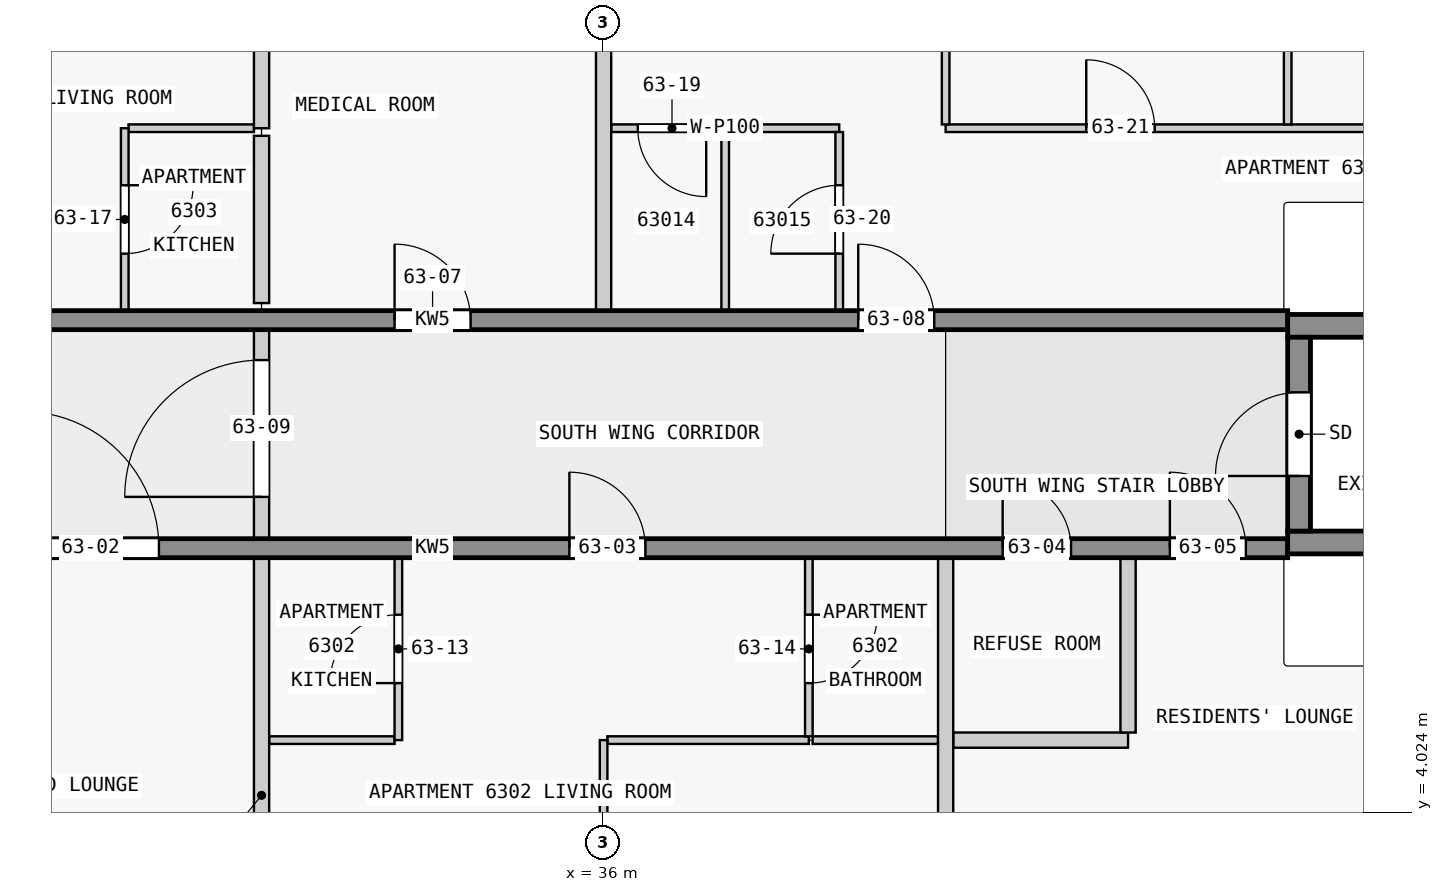
"""IFC4 building model, lengths in metres.
Left out: names, types, materials, properties, quantities, classifications, styles, units other than length and angle.
Written with IfcOpenShell. Run it as: python <this file> out.ifc"""

import sys

from ifc_helpers import new_model, si_unit, direction, frame, frame_2d, origin, place, context, subcontext, project, spatial, rectangle, extrude, element, fill, save


model = new_model("IFC4")
c1 = context("Model", 3, precision=1e-05, world=origin(), true_north=direction((0.0, 1.0)))
c2 = subcontext(c1, "Body", "Model", "MODEL_VIEW")
j1 = project(units=[si_unit("LENGTHUNIT", "METRE"), si_unit("PLANEANGLEUNIT", "RADIAN")], contexts=[c1])
p1 = place(None, origin())
s1 = spatial("IfcSite", under=j1, at=p1, CompositionType="ELEMENT")
p2 = place(p1, origin())
s2 = spatial("IfcBuilding", under=s1, at=p2, CompositionType="ELEMENT")
p3 = place(p2, frame((0.0, 0.0, 242.4)))
s3 = spatial("IfcBuildingStorey", under=s2, at=p3, CompositionType="ELEMENT", Elevation=242.4)
p4 = place(p3, frame((45.15, 7.725, 0.0), z_axis=(0.0, 0.0, 1.0), x_axis=(0.0, 1.0, 0.0)))
e1 = element("IfcWall", 1, at=p4, inside=s3, PredefinedType="SHEAR", context=c2, shape_type="SweptSolid", body=[
    extrude(rectangle(XDim=2.55, YDim=0.3, at=frame_2d((1.275, 0.0))), origin(), (0.0, 0.0, 1.0), 3.5),
])
p5 = place(p4, frame((0.725, 0.0, 0.0)))
e2 = element("IfcOpeningElement", 2, at=p5, cuts=e1, PredefinedType="OPENING", context=c2, shape_type="SweptSolid", body=[
    extrude(rectangle(XDim=1.1, YDim=2.1, at=frame_2d((0.55, 1.05))), frame((0.0, 0.16, 0.0), z_axis=(0.0, -1.0, 0.0), x_axis=(1.0, 0.0, 0.0)), (0.0, 0.0, 1.0), 0.32),
])
for number, where, z_axis, x_axis in (
    (3, (45.0, 7.575, 0.0), (0.0, 0.0, 1.0), (1.0, 0.0, 0.0)),
    (4, (45.0, 10.425, 0.0), (0.0, 0.0, 1.0), (1.0, 0.0, 0.0)),
):
    element("IfcWall", number, at=place(p3, frame(where, z_axis=z_axis, x_axis=x_axis)), inside=s3, PredefinedType="SHEAR", context=c2, shape_type="SweptSolid", body=[
        extrude(rectangle(XDim=7.2, YDim=0.3, at=frame_2d((3.6, 0.0))), origin(), (0.0, 0.0, 1.0), 3.5),
    ])
p6 = place(p3, frame((22.5, 7.5, 0.0), z_axis=(0.0, 0.0, 1.0), x_axis=(1.0, 0.0, 0.0)))
e5 = element("IfcWall", 5, at=p6, inside=s3, PredefinedType="SHEAR", context=c2, shape_type="SweptSolid", body=[
    extrude(rectangle(XDim=22.5, YDim=0.25, at=frame_2d((11.25, 0.0))), origin(), (0.0, 0.0, 1.0), 3.25),
])
p7 = place(p6, frame((1.75, 0.0, 0.0)))
e6 = element("IfcOpeningElement", 6, at=p7, cuts=e5, PredefinedType="OPENING", context=c2, shape_type="SweptSolid", body=[
    extrude(rectangle(XDim=1.0, YDim=2.1, at=frame_2d((0.5, 1.05))), frame((0.0, 0.135, 0.0), z_axis=(0.0, -1.0, 0.0), x_axis=(1.0, 0.0, 0.0)), (0.0, 0.0, 1.0), 0.27),
])
p8 = place(p6, frame((5.85, 0.0, 0.0)))
e7 = element("IfcOpeningElement", 7, at=p8, cuts=e5, PredefinedType="OPENING", context=c2, shape_type="SweptSolid", body=[
    extrude(rectangle(XDim=1.8, YDim=2.1, at=frame_2d((0.9, 1.05))), frame((0.0, 0.135, 0.0), z_axis=(0.0, -1.0, 0.0), x_axis=(1.0, 0.0, 0.0)), (0.0, 0.0, 1.0), 0.27),
])
p9 = place(p6, frame((13.05, 0.0, 0.0)))
e8 = element("IfcOpeningElement", 8, at=p9, cuts=e5, PredefinedType="OPENING", context=c2, shape_type="SweptSolid", body=[
    extrude(rectangle(XDim=1.0, YDim=2.1, at=frame_2d((0.5, 1.05))), frame((0.0, 0.135, 0.0), z_axis=(0.0, -1.0, 0.0), x_axis=(1.0, 0.0, 0.0)), (0.0, 0.0, 1.0), 0.27),
])
p10 = place(p6, frame((18.75, 0.0, 0.0)))
e9 = element("IfcOpeningElement", 9, at=p10, cuts=e5, PredefinedType="OPENING", context=c2, shape_type="SweptSolid", body=[
    extrude(rectangle(XDim=0.9, YDim=2.1, at=frame_2d((0.45, 1.05))), frame((0.0, 0.135, 0.0), z_axis=(0.0, -1.0, 0.0), x_axis=(1.0, 0.0, 0.0)), (0.0, 0.0, 1.0), 0.27),
])
p11 = place(p6, frame((20.95, 0.0, 0.0)))
e10 = element("IfcOpeningElement", 10, at=p11, cuts=e5, PredefinedType="OPENING", context=c2, shape_type="SweptSolid", body=[
    extrude(rectangle(XDim=1.0, YDim=2.1, at=frame_2d((0.5, 1.05))), frame((0.0, 0.135, 0.0), z_axis=(0.0, -1.0, 0.0), x_axis=(1.0, 0.0, 0.0)), (0.0, 0.0, 1.0), 0.27),
])
p12 = place(p3, frame((22.5, 10.5, 0.0), z_axis=(0.0, 0.0, 1.0), x_axis=(1.0, 0.0, 0.0)))
e11 = element("IfcWall", 11, at=p12, inside=s3, PredefinedType="SHEAR", context=c2, shape_type="SweptSolid", body=[
    extrude(rectangle(XDim=22.5, YDim=0.25, at=frame_2d((11.25, 0.0))), origin(), (0.0, 0.0, 1.0), 3.25),
])
p13 = place(p12, frame((4.05, 0.0, 0.0)))
e12 = element("IfcOpeningElement", 12, at=p13, cuts=e11, PredefinedType="OPENING", context=c2, shape_type="SweptSolid", body=[
    extrude(rectangle(XDim=1.0, YDim=2.1, at=frame_2d((0.5, 1.05))), frame((0.0, 0.135, 0.0), z_axis=(0.0, -1.0, 0.0), x_axis=(1.0, 0.0, 0.0)), (0.0, 0.0, 1.0), 0.27),
])
p14 = place(p12, frame((10.75, 0.0, 0.0)))
e13 = element("IfcOpeningElement", 13, at=p14, cuts=e11, PredefinedType="OPENING", context=c2, shape_type="SweptSolid", body=[
    extrude(rectangle(XDim=1.0, YDim=2.1, at=frame_2d((0.5, 1.05))), frame((0.0, 0.135, 0.0), z_axis=(0.0, -1.0, 0.0), x_axis=(1.0, 0.0, 0.0)), (0.0, 0.0, 1.0), 0.27),
])
p15 = place(p12, frame((16.85, 0.0, 0.0)))
e14 = element("IfcOpeningElement", 14, at=p15, cuts=e11, PredefinedType="OPENING", context=c2, shape_type="SweptSolid", body=[
    extrude(rectangle(XDim=1.0, YDim=2.1, at=frame_2d((0.5, 1.05))), frame((0.0, 0.135, 0.0), z_axis=(0.0, -1.0, 0.0), x_axis=(1.0, 0.0, 0.0)), (0.0, 0.0, 1.0), 0.27),
])
p16 = place(p3, frame((38.7, 4.975, 0.0), z_axis=(0.0, 0.0, 1.0), x_axis=(-1.0, 0.0, 0.0)))
e15 = element("IfcWall", 15, at=p16, inside=s3, PredefinedType="PARTITIONING", context=c2, shape_type="SweptSolid", body=[
    extrude(rectangle(XDim=2.65, YDim=0.1, at=frame_2d((1.325, 0.0))), origin(), (0.0, 0.0, 1.0), 3.25),
])
for number, where, z_axis, x_axis in (
    (16, (31.6, 4.975, 0.0), (0.0, 0.0, 1.0), (1.0, 0.0, 0.0)),
    (17, (38.75, 4.975, 0.0), (0.0, 0.0, 1.0), (1.0, 0.0, 0.0)),
):
    element("IfcWall", number, at=place(p3, frame(where, z_axis=z_axis, x_axis=x_axis)), inside=s3, PredefinedType="PARTITIONING", context=c2, shape_type="SweptSolid", body=[
        extrude(rectangle(XDim=1.65, YDim=0.1, at=frame_2d((0.825, 0.0))), origin(), (0.0, 0.0, 1.0), 3.25),
    ])
p17 = place(p3, frame((40.6, 4.975, 0.0), z_axis=(0.0, 0.0, 1.0), x_axis=(1.0, 0.0, 0.0)))
e18 = element("IfcWall", 18, at=p17, inside=s3, PredefinedType="PARTITIONING", context=c2, shape_type="SweptSolid", body=[
    extrude(rectangle(XDim=2.3, YDim=0.2, at=frame_2d((1.15, 0.0))), origin(), (0.0, 0.0, 1.0), 3.25),
])
p18 = place(p3, frame((31.4, 13.025, 0.0), z_axis=(0.0, 0.0, 1.0), x_axis=(-1.0, 0.0, 0.0)))
e19 = element("IfcWall", 19, at=p18, inside=s3, PredefinedType="PARTITIONING", context=c2, shape_type="SweptSolid", body=[
    extrude(rectangle(XDim=1.65, YDim=0.1, at=frame_2d((0.825, 0.0))), origin(), (0.0, 0.0, 1.0), 3.25),
])
p19 = place(p3, frame((39.1, 13.025, 0.0), z_axis=(0.0, 0.0, 1.0), x_axis=(-1.0, 0.0, 0.0)))
e20 = element("IfcWall", 20, at=p19, inside=s3, PredefinedType="PARTITIONING", context=c2, shape_type="SweptSolid", body=[
    extrude(rectangle(XDim=3.0, YDim=0.1, at=frame_2d((1.5, 0.0))), origin(), (0.0, 0.0, 1.0), 3.25),
])
p20 = place(p19, frame((1.75, 0.0, 0.0)))
e21 = element("IfcOpeningElement", 21, at=p20, cuts=e20, PredefinedType="OPENING", context=c2, shape_type="SweptSolid", body=[
    extrude(rectangle(XDim=0.9, YDim=2.1, at=frame_2d((0.45, 1.05))), frame((0.0, 0.06, 0.0), z_axis=(0.0, -1.0, 0.0), x_axis=(1.0, 0.0, 0.0)), (0.0, 0.0, 1.0), 0.12),
])
p21 = place(p3, frame((40.5, 13.025, 0.0), z_axis=(0.0, 0.0, 1.0), x_axis=(1.0, 0.0, 0.0)))
e22 = element("IfcWall", 22, at=p21, inside=s3, PredefinedType="PARTITIONING", context=c2, shape_type="SweptSolid", body=[
    extrude(rectangle(XDim=13.58, YDim=0.1, at=frame_2d((6.79, 0.0))), origin(), (0.0, 0.0, 1.0), 3.25),
])
p22 = place(p21, frame((1.85, 0.0, 0.0)))
e23 = element("IfcOpeningElement", 23, at=p22, cuts=e22, PredefinedType="OPENING", context=c2, shape_type="SweptSolid", body=[
    extrude(rectangle(XDim=0.9, YDim=2.1, at=frame_2d((0.45, 1.05))), frame((0.0, 0.06, 0.0), z_axis=(0.0, -1.0, 0.0), x_axis=(1.0, 0.0, 0.0)), (0.0, 0.0, 1.0), 0.12),
])
p23 = place(p21, frame((6.35, 0.0, 0.0)))
e24 = element("IfcOpeningElement", 24, at=p23, cuts=e22, PredefinedType="OPENING", context=c2, shape_type="SweptSolid", body=[
    extrude(rectangle(XDim=0.9, YDim=2.1, at=frame_2d((0.45, 1.05))), frame((0.0, 0.06, 0.0), z_axis=(0.0, -1.0, 0.0), x_axis=(1.0, 0.0, 0.0)), (0.0, 0.0, 1.0), 0.12),
])
p24 = place(p21, frame((10.75, 0.0, 0.0)))
e25 = element("IfcOpeningElement", 25, at=p24, cuts=e22, PredefinedType="OPENING", context=c2, shape_type="SweptSolid", body=[
    extrude(rectangle(XDim=0.9, YDim=2.1, at=frame_2d((0.45, 1.05))), frame((0.0, 0.06, 0.0), z_axis=(0.0, -1.0, 0.0), x_axis=(1.0, 0.0, 0.0)), (0.0, 0.0, 1.0), 0.12),
])
p25 = place(p3, frame((29.7, 13.025, 0.0), z_axis=(0.0, 0.0, 1.0), x_axis=(0.0, -1.0, 0.0)))
e26 = element("IfcWall", 26, at=p25, inside=s3, PredefinedType="PARTITIONING", context=c2, shape_type="SweptSolid", body=[
    extrude(rectangle(XDim=2.4, YDim=0.1, at=frame_2d((1.2, 0.0))), origin(), (0.0, 0.0, 1.0), 3.25),
])
p26 = place(p25, frame((0.75, 0.0, 0.0)))
e27 = element("IfcOpeningElement", 27, at=p26, cuts=e26, PredefinedType="OPENING", context=c2, shape_type="SweptSolid", body=[
    extrude(rectangle(XDim=0.9, YDim=2.1, at=frame_2d((0.45, 1.05))), frame((0.0, 0.06, 0.0), z_axis=(0.0, -1.0, 0.0), x_axis=(1.0, 0.0, 0.0)), (0.0, 0.0, 1.0), 0.12),
])
p27 = place(p3, frame((31.5, 16.878, 0.0), z_axis=(0.0, 0.0, 1.0), x_axis=(0.0, -1.0, 0.0)))
e28 = element("IfcWall", 28, at=p27, inside=s3, PredefinedType="PARTITIONING", context=c2, shape_type="SweptSolid", body=[
    extrude(rectangle(XDim=3.853, YDim=0.2, at=frame_2d((1.926, 0.0))), origin(), (0.0, 0.0, 1.0), 3.25),
])
p28 = place(p3, frame((31.5, 1.122, 0.0), z_axis=(0.0, 0.0, 1.0), x_axis=(0.0, 1.0, 0.0)))
e29 = element("IfcWall", 29, at=p28, inside=s3, PredefinedType="PARTITIONING", context=c2, shape_type="SweptSolid", body=[
    extrude(rectangle(XDim=6.253, YDim=0.2, at=frame_2d((3.126, 0.0))), origin(), (0.0, 0.0, 1.0), 3.25),
])
p29 = place(p3, frame((31.5, 10.725, 0.0), z_axis=(0.0, 0.0, 1.0), x_axis=(0.0, 1.0, 0.0)))
e30 = element("IfcWall", 30, at=p29, inside=s3, PredefinedType="PARTITIONING", context=c2, shape_type="SweptSolid", body=[
    extrude(rectangle(XDim=2.2, YDim=0.2, at=frame_2d((1.1, 0.0))), origin(), (0.0, 0.0, 1.0), 3.25),
])
p30 = place(p3, frame((33.3, 4.975, 0.0), z_axis=(0.0, 0.0, 1.0), x_axis=(0.0, 1.0, 0.0)))
e31 = element("IfcWall", 31, at=p30, inside=s3, PredefinedType="PARTITIONING", context=c2, shape_type="SweptSolid", body=[
    extrude(rectangle(XDim=2.4, YDim=0.1, at=frame_2d((1.2, 0.0))), origin(), (0.0, 0.0, 1.0), 3.25),
])
p31 = place(p30, frame((0.75, 0.0, 0.0)))
e32 = element("IfcOpeningElement", 32, at=p31, cuts=e31, PredefinedType="OPENING", context=c2, shape_type="SweptSolid", body=[
    extrude(rectangle(XDim=0.9, YDim=2.1, at=frame_2d((0.45, 1.05))), frame((0.0, 0.06, 0.0), z_axis=(0.0, -1.0, 0.0), x_axis=(1.0, 0.0, 0.0)), (0.0, 0.0, 1.0), 0.12),
])
p32 = place(p3, frame((36.0, 4.975, 0.0), z_axis=(0.0, 0.0, 1.0), x_axis=(0.0, -1.0, 0.0)))
e33 = element("IfcWall", 33, at=p32, inside=s3, PredefinedType="PARTITIONING", context=c2, shape_type="SweptSolid", body=[
    extrude(rectangle(XDim=3.575, YDim=0.1, at=frame_2d((1.788, 0.0))), origin(), (0.0, 0.0, 1.0), 3.25),
])
p33 = place(p32, frame((1.35, 0.0, 0.0)))
e34 = element("IfcOpeningElement", 34, at=p33, cuts=e33, PredefinedType="OPENING", context=c2, shape_type="SweptSolid", body=[
    extrude(rectangle(XDim=0.9, YDim=2.1, at=frame_2d((0.45, 1.05))), frame((0.0, 0.06, 0.0), z_axis=(0.0, -1.0, 0.0), x_axis=(1.0, 0.0, 0.0)), (0.0, 0.0, 1.0), 0.12),
])
p34 = place(p3, frame((36.0, 10.625, 0.0), z_axis=(0.0, 0.0, 1.0), x_axis=(0.0, 1.0, 0.0)))
e35 = element("IfcWall", 35, at=p34, inside=s3, PredefinedType="PARTITIONING", context=c2, shape_type="SweptSolid", body=[
    extrude(rectangle(XDim=5.975, YDim=0.2, at=frame_2d((2.988, 0.0))), origin(), (0.0, 0.0, 1.0), 3.25),
])
p35 = place(p3, frame((37.6, 10.625, 0.0), z_axis=(0.0, 0.0, 1.0), x_axis=(0.0, 1.0, 0.0)))
e36 = element("IfcWall", 36, at=p35, inside=s3, PredefinedType="PARTITIONING", context=c2, shape_type="SweptSolid", body=[
    extrude(rectangle(XDim=2.35, YDim=0.1, at=frame_2d((1.175, 0.0))), origin(), (0.0, 0.0, 1.0), 3.25),
])
p36 = place(p3, frame((38.7, 7.375, 0.0), z_axis=(0.0, 0.0, 1.0), x_axis=(0.0, -1.0, 0.0)))
e37 = element("IfcWall", 37, at=p36, inside=s3, PredefinedType="PARTITIONING", context=c2, shape_type="SweptSolid", body=[
    extrude(rectangle(XDim=2.35, YDim=0.1, at=frame_2d((1.175, 0.0))), origin(), (0.0, 0.0, 1.0), 3.25),
])
p37 = place(p36, frame((0.75, 0.0, 0.0)))
e38 = element("IfcOpeningElement", 38, at=p37, cuts=e37, PredefinedType="OPENING", context=c2, shape_type="SweptSolid", body=[
    extrude(rectangle(XDim=0.9, YDim=2.1, at=frame_2d((0.45, 1.05))), frame((0.0, 0.06, 0.0), z_axis=(0.0, -1.0, 0.0), x_axis=(1.0, 0.0, 0.0)), (0.0, 0.0, 1.0), 0.12),
])
p38 = place(p3, frame((39.1, 10.625, 0.0), z_axis=(0.0, 0.0, 1.0), x_axis=(0.0, 1.0, 0.0)))
e39 = element("IfcWall", 39, at=p38, inside=s3, PredefinedType="PARTITIONING", context=c2, shape_type="SweptSolid", body=[
    extrude(rectangle(XDim=2.35, YDim=0.1, at=frame_2d((1.175, 0.0))), origin(), (0.0, 0.0, 1.0), 3.25),
])
p39 = place(p38, frame((0.75, 0.0, 0.0)))
e40 = element("IfcOpeningElement", 40, at=p39, cuts=e39, PredefinedType="OPENING", context=c2, shape_type="SweptSolid", body=[
    extrude(rectangle(XDim=0.9, YDim=2.1, at=frame_2d((0.45, 1.05))), frame((0.0, 0.06, 0.0), z_axis=(0.0, -1.0, 0.0), x_axis=(1.0, 0.0, 0.0)), (0.0, 0.0, 1.0), 0.12),
])
p40 = place(p3, frame((40.5, 16.878, 0.0), z_axis=(0.0, 0.0, 1.0), x_axis=(0.0, -1.0, 0.0)))
e41 = element("IfcWall", 41, at=p40, inside=s3, PredefinedType="PARTITIONING", context=c2, shape_type="SweptSolid", body=[
    extrude(rectangle(XDim=3.803, YDim=0.1, at=frame_2d((1.901, 0.0))), origin(), (0.0, 0.0, 1.0), 3.25),
])
p41 = place(p3, frame((40.5, 1.122, 0.0), z_axis=(0.0, 0.0, 1.0), x_axis=(0.0, 1.0, 0.0)))
e42 = element("IfcWall", 42, at=p41, inside=s3, PredefinedType="PARTITIONING", context=c2, shape_type="SweptSolid", body=[
    extrude(rectangle(XDim=6.253, YDim=0.2, at=frame_2d((3.126, 0.0))), origin(), (0.0, 0.0, 1.0), 3.25),
])
p42 = place(p3, frame((42.9, 5.075, 0.0), z_axis=(0.0, 0.0, 1.0), x_axis=(0.0, 1.0, 0.0)))
e43 = element("IfcWall", 43, at=p42, inside=s3, PredefinedType="PARTITIONING", context=c2, shape_type="SweptSolid", body=[
    extrude(rectangle(XDim=2.3, YDim=0.2, at=frame_2d((1.15, 0.0))), origin(), (0.0, 0.0, 1.0), 3.25),
])
p43 = place(p3, frame((45.0, 13.075, 0.0), z_axis=(0.0, 0.0, 1.0), x_axis=(0.0, 1.0, 0.0)))
e44 = element("IfcWall", 44, at=p43, inside=s3, PredefinedType="PARTITIONING", context=c2, shape_type="SweptSolid", body=[
    extrude(rectangle(XDim=3.398, YDim=0.1, at=frame_2d((1.699, 0.0))), origin(), (0.0, 0.0, 1.0), 3.25),
])
p44 = place(p3, frame((31.5, 7.475, 0.0), z_axis=(0.0, 0.0, 1.0), x_axis=(0.0, 1.0, 0.0)))
e45 = element("IfcWall", 45, at=p44, inside=s3, PredefinedType="PARTITIONING", context=c2, shape_type="SweptSolid", body=[
    extrude(rectangle(XDim=3.15, YDim=0.2, at=frame_2d((1.575, 0.0))), origin(), (0.0, 0.0, 1.0), 3.25),
])
p45 = place(p44, frame((0.7, 0.0, 0.0)))
e46 = element("IfcOpeningElement", 46, at=p45, cuts=e45, PredefinedType="OPENING", context=c2, shape_type="SweptSolid", body=[
    extrude(rectangle(XDim=1.8, YDim=2.1, at=frame_2d((0.9, 1.05))), frame((0.0, 0.11, 0.0), z_axis=(0.0, -1.0, 0.0), x_axis=(1.0, 0.0, 0.0)), (0.0, 0.0, 1.0), 0.22),
])
p46 = place(p5, origin())
e47 = element("IfcDoor", 47, at=p46, inside=s3, OperationType="SINGLE_SWING_LEFT", PredefinedType="DOOR", context=c2, shape_type="SweptSolid", body=[
    extrude(rectangle(XDim=1.1, YDim=2.1, at=frame_2d((0.55, 1.05))), frame((0.0, 0.025, 0.0), z_axis=(0.0, -1.0, 0.0), x_axis=(1.0, 0.0, 0.0)), (0.0, 0.0, 1.0), 0.05),
])
fill(e2, e47)
p47 = place(p8, origin())
e48 = element("IfcDoor", 48, at=p47, inside=s3, OperationType="SINGLE_SWING_LEFT", PredefinedType="DOOR", context=c2, shape_type="SweptSolid", body=[
    extrude(rectangle(XDim=1.8, YDim=2.1, at=frame_2d((0.9, 1.05))), frame((0.0, 0.025, 0.0), z_axis=(0.0, -1.0, 0.0), x_axis=(1.0, 0.0, 0.0)), (0.0, 0.0, 1.0), 0.05),
])
fill(e7, e48)
p48 = place(p9, origin())
e49 = element("IfcDoor", 49, at=p48, inside=s3, OperationType="SINGLE_SWING_RIGHT", PredefinedType="DOOR", context=c2, shape_type="SweptSolid", body=[
    extrude(rectangle(XDim=1.0, YDim=2.1, at=frame_2d((0.5, 1.05))), frame((0.0, 0.025, 0.0), z_axis=(0.0, -1.0, 0.0), x_axis=(1.0, 0.0, 0.0)), (0.0, 0.0, 1.0), 0.05),
])
fill(e8, e49)
p49 = place(p10, origin())
e50 = element("IfcDoor", 50, at=p49, inside=s3, OperationType="SINGLE_SWING_RIGHT", PredefinedType="DOOR", context=c2, shape_type="SweptSolid", body=[
    extrude(rectangle(XDim=0.9, YDim=2.1, at=frame_2d((0.45, 1.05))), frame((0.0, 0.025, 0.0), z_axis=(0.0, -1.0, 0.0), x_axis=(1.0, 0.0, 0.0)), (0.0, 0.0, 1.0), 0.05),
])
fill(e9, e50)
p50 = place(p11, origin())
e51 = element("IfcDoor", 51, at=p50, inside=s3, OperationType="SINGLE_SWING_RIGHT", PredefinedType="DOOR", context=c2, shape_type="SweptSolid", body=[
    extrude(rectangle(XDim=1.0, YDim=2.1, at=frame_2d((0.5, 1.05))), frame((0.0, 0.025, 0.0), z_axis=(0.0, -1.0, 0.0), x_axis=(1.0, 0.0, 0.0)), (0.0, 0.0, 1.0), 0.05),
])
fill(e10, e51)
p51 = place(p14, origin())
e52 = element("IfcDoor", 52, at=p51, inside=s3, OperationType="SINGLE_SWING_LEFT", PredefinedType="DOOR", context=c2, shape_type="SweptSolid", body=[
    extrude(rectangle(XDim=1.0, YDim=2.1, at=frame_2d((0.5, 1.05))), frame((0.0, 0.025, 0.0), z_axis=(0.0, -1.0, 0.0), x_axis=(1.0, 0.0, 0.0)), (0.0, 0.0, 1.0), 0.05),
])
fill(e13, e52)
p52 = place(p15, origin())
e53 = element("IfcDoor", 53, at=p52, inside=s3, OperationType="SINGLE_SWING_RIGHT", PredefinedType="DOOR", context=c2, shape_type="SweptSolid", body=[
    extrude(rectangle(XDim=1.0, YDim=2.1, at=frame_2d((0.5, 1.05))), frame((0.0, 0.025, 0.0), z_axis=(0.0, -1.0, 0.0), x_axis=(1.0, 0.0, 0.0)), (0.0, 0.0, 1.0), 0.05),
])
fill(e14, e53)
p53 = place(p45, origin())
e54 = element("IfcDoor", 54, at=p53, inside=s3, OperationType="SINGLE_SWING_RIGHT", PredefinedType="DOOR", context=c2, shape_type="SweptSolid", body=[
    extrude(rectangle(XDim=1.8, YDim=2.1, at=frame_2d((0.9, 1.05))), frame((0.0, 0.025, 0.0), z_axis=(0.0, -1.0, 0.0), x_axis=(1.0, 0.0, 0.0)), (0.0, 0.0, 1.0), 0.05),
])
fill(e46, e54)
p54 = place(p31, origin())
e55 = element("IfcDoor", 55, at=p54, inside=s3, OperationType="SINGLE_SWING_LEFT", PredefinedType="DOOR", context=c2, shape_type="SweptSolid", body=[
    extrude(rectangle(XDim=0.9, YDim=2.1, at=frame_2d((0.45, 1.05))), frame((0.0, 0.025, 0.0), z_axis=(0.0, -1.0, 0.0), x_axis=(1.0, 0.0, 0.0)), (0.0, 0.0, 1.0), 0.05),
])
fill(e32, e55)
p55 = place(p37, origin())
e56 = element("IfcDoor", 56, at=p55, inside=s3, OperationType="SINGLE_SWING_RIGHT", PredefinedType="DOOR", context=c2, shape_type="SweptSolid", body=[
    extrude(rectangle(XDim=0.9, YDim=2.1, at=frame_2d((0.45, 1.05))), frame((0.0, 0.025, 0.0), z_axis=(0.0, -1.0, 0.0), x_axis=(1.0, 0.0, 0.0)), (0.0, 0.0, 1.0), 0.05),
])
fill(e38, e56)
p56 = place(p26, origin())
e57 = element("IfcDoor", 57, at=p56, inside=s3, OperationType="SINGLE_SWING_LEFT", PredefinedType="DOOR", context=c2, shape_type="SweptSolid", body=[
    extrude(rectangle(XDim=0.9, YDim=2.1, at=frame_2d((0.45, 1.05))), frame((0.0, 0.025, 0.0), z_axis=(0.0, -1.0, 0.0), x_axis=(1.0, 0.0, 0.0)), (0.0, 0.0, 1.0), 0.05),
])
fill(e27, e57)
p57 = place(p20, origin())
e58 = element("IfcDoor", 58, at=p57, inside=s3, OperationType="SINGLE_SWING_RIGHT", PredefinedType="DOOR", context=c2, shape_type="SweptSolid", body=[
    extrude(rectangle(XDim=0.9, YDim=2.1, at=frame_2d((0.45, 1.05))), frame((0.0, 0.025, 0.0), z_axis=(0.0, -1.0, 0.0), x_axis=(1.0, 0.0, 0.0)), (0.0, 0.0, 1.0), 0.05),
])
fill(e21, e58)
p58 = place(p39, origin())
e59 = element("IfcDoor", 59, at=p58, inside=s3, OperationType="SINGLE_SWING_RIGHT", PredefinedType="DOOR", context=c2, shape_type="SweptSolid", body=[
    extrude(rectangle(XDim=0.9, YDim=2.1, at=frame_2d((0.45, 1.05))), frame((0.0, 0.025, 0.0), z_axis=(0.0, -1.0, 0.0), x_axis=(1.0, 0.0, 0.0)), (0.0, 0.0, 1.0), 0.05),
])
fill(e40, e59)
p59 = place(p22, origin())
e60 = element("IfcDoor", 60, at=p59, inside=s3, OperationType="SINGLE_SWING_LEFT", PredefinedType="DOOR", context=c2, shape_type="SweptSolid", body=[
    extrude(rectangle(XDim=0.9, YDim=2.1, at=frame_2d((0.45, 1.05))), frame((0.0, 0.025, 0.0), z_axis=(0.0, -1.0, 0.0), x_axis=(1.0, 0.0, 0.0)), (0.0, 0.0, 1.0), 0.05),
])
fill(e23, e60)
save(model, sys.argv[1])
